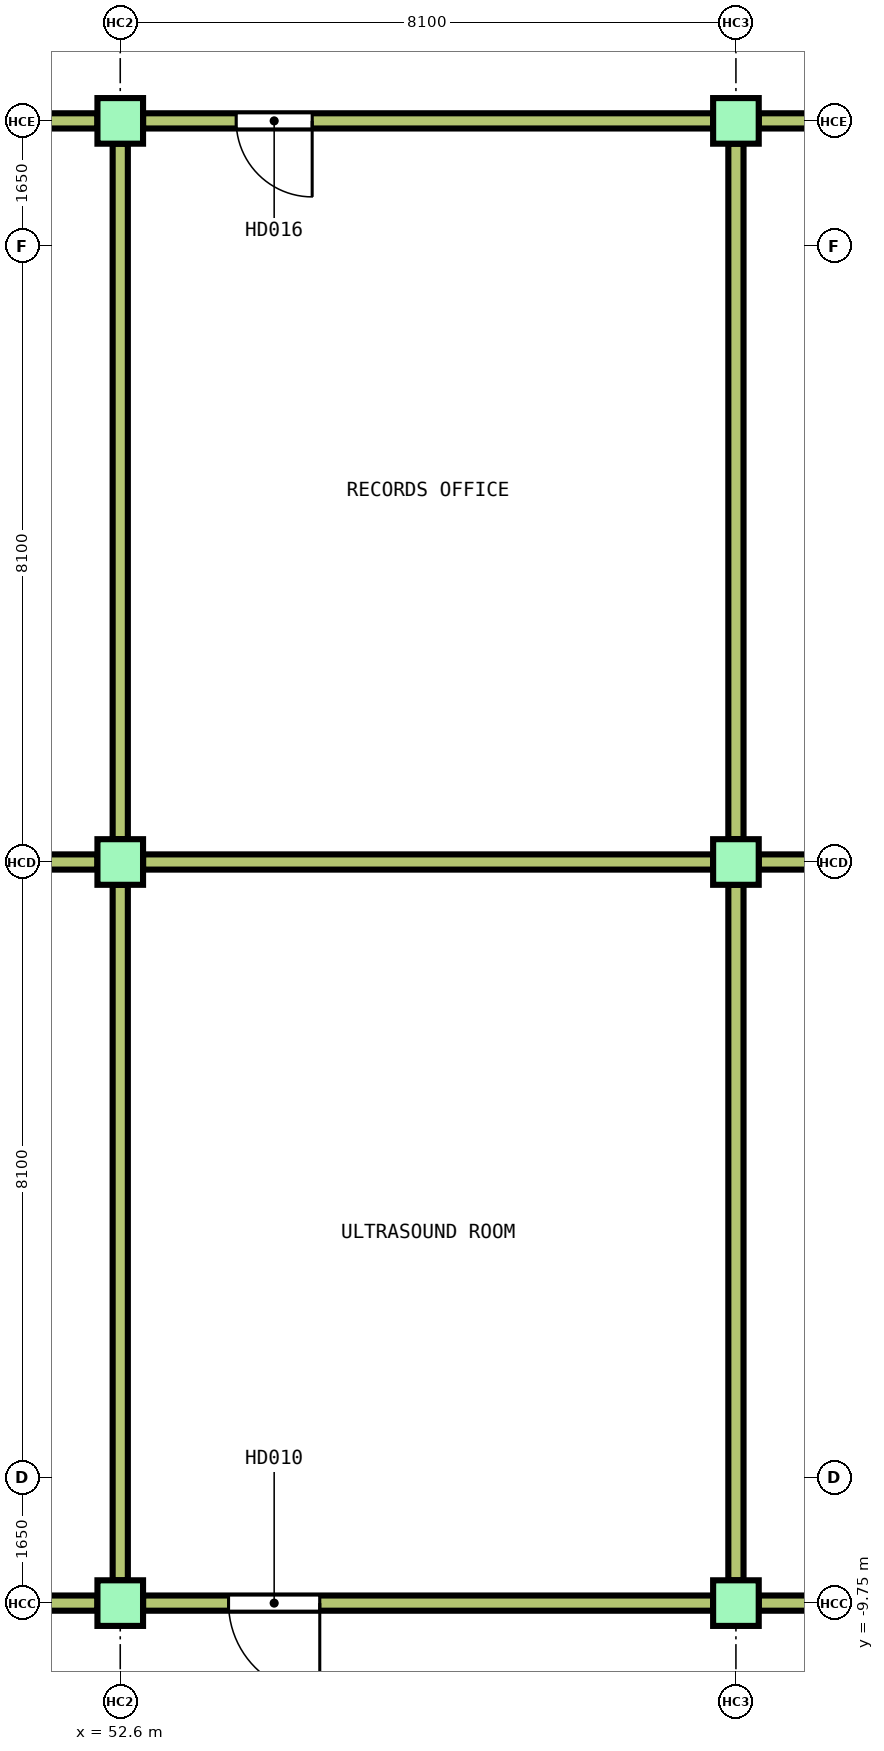
"""IFC4 building model, lengths in metres.
Left out: names, types, materials, properties, quantities, classifications, styles, units other than length and angle.
Written with IfcOpenShell. Run it as: python <this file> out.ifc"""

import sys

from ifc_helpers import new_model, si_unit, direction, frame, frame_2d, origin, origin_2d, place, context, subcontext, project, spatial, rectangle, extrude, element, fill, save


model = new_model("IFC4")
c1 = context("Model", 3, precision=1e-05, world=origin(), true_north=direction((0.0, 1.0)))
c2 = subcontext(c1, "Body", "Model", "MODEL_VIEW")
j1 = project(units=[si_unit("LENGTHUNIT", "METRE"), si_unit("PLANEANGLEUNIT", "RADIAN")], contexts=[c1])
p1 = place(None, origin())
s1 = spatial("IfcSite", under=j1, at=p1, CompositionType="ELEMENT")
p2 = place(p1, origin())
s2 = spatial("IfcBuilding", under=s1, at=p2, CompositionType="ELEMENT")
p3 = place(p2, origin())
s3 = spatial("IfcBuildingStorey", under=s2, at=p3, CompositionType="ELEMENT", Elevation=0.0)
for number, where, z_axis, x_axis in (
    (1, (52.6, -9.75, -0.25), (0.0, 0.0, 1.0), (1.0, 0.0, 0.0)),
    (2, (60.7, -9.75, -0.25), (0.0, 0.0, 1.0), (1.0, 0.0, 0.0)),
    (3, (52.6, 0.0, -0.25), (0.0, 0.0, 1.0), (1.0, 0.0, 0.0)),
    (4, (60.7, 0.0, -0.25), (0.0, 0.0, 1.0), (1.0, 0.0, 0.0)),
    (5, (52.6, 9.75, -0.25), (0.0, 0.0, 1.0), (1.0, 0.0, 0.0)),
    (6, (60.7, 9.75, -0.25), (0.0, 0.0, 1.0), (1.0, 0.0, 0.0)),
):
    element("IfcColumn", number, at=place(p3, frame(where, z_axis=z_axis, x_axis=x_axis)), inside=s3, PredefinedType="COLUMN", context=c2, shape_type="SweptSolid", body=[
        extrude(rectangle(XDim=0.6, YDim=0.6, at=origin_2d()), origin(), (0.0, 0.0, 1.0), 5.85),
    ])
for number, where, z_axis, x_axis in (
    (7, (60.7, -9.45, 0.0), (0.0, 0.0, 1.0), (0.0, 1.0, 0.0)),
    (8, (60.7, 0.3, 0.0), (0.0, 0.0, 1.0), (0.0, 1.0, 0.0)),
):
    element("IfcWall", number, at=place(p3, frame(where, z_axis=z_axis, x_axis=x_axis)), inside=s3, PredefinedType="PARTITIONING", context=c2, shape_type="SweptSolid", body=[
        extrude(rectangle(XDim=9.15, YDim=0.2, at=frame_2d((4.575, 0.0))), origin(), (0.0, 0.0, 1.0), 4.8),
    ])
p4 = place(p3, frame((44.8, -9.75, 0.0), z_axis=(0.0, 0.0, 1.0), x_axis=(1.0, 0.0, 0.0)))
e9 = element("IfcWall", 9, at=p4, inside=s3, PredefinedType="PARTITIONING", context=c2, shape_type="SweptSolid", body=[
    extrude(rectangle(XDim=7.5, YDim=0.2, at=frame_2d((3.75, 0.0))), origin(), (0.0, 0.0, 1.0), 4.8),
])
p5 = place(p4, frame((1.125, 0.0, 0.0)))
e10 = element("IfcOpeningElement", 10, at=p5, cuts=e9, PredefinedType="OPENING", context=c2, shape_type="SweptSolid", body=[
    extrude(rectangle(XDim=1.2, YDim=2.1, at=frame_2d((0.6, 1.05))), frame((0.0, 0.11, 0.0), z_axis=(0.0, -1.0, 0.0), x_axis=(1.0, 0.0, 0.0)), (0.0, 0.0, 1.0), 0.22),
])
p6 = place(p3, frame((52.9, -9.75, 0.0), z_axis=(0.0, 0.0, 1.0), x_axis=(1.0, 0.0, 0.0)))
e11 = element("IfcWall", 11, at=p6, inside=s3, PredefinedType="PARTITIONING", context=c2, shape_type="SweptSolid", body=[
    extrude(rectangle(XDim=7.5, YDim=0.2, at=frame_2d((3.75, 0.0))), origin(), (0.0, 0.0, 1.0), 4.8),
])
p7 = place(p6, frame((1.125, 0.0, 0.0)))
e12 = element("IfcOpeningElement", 12, at=p7, cuts=e11, PredefinedType="OPENING", context=c2, shape_type="SweptSolid", body=[
    extrude(rectangle(XDim=1.2, YDim=2.1, at=frame_2d((0.6, 1.05))), frame((0.0, 0.11, 0.0), z_axis=(0.0, -1.0, 0.0), x_axis=(1.0, 0.0, 0.0)), (0.0, 0.0, 1.0), 0.22),
])
p8 = place(p3, frame((61.0, -9.75, 0.0), z_axis=(0.0, 0.0, 1.0), x_axis=(1.0, 0.0, 0.0)))
e13 = element("IfcWall", 13, at=p8, inside=s3, PredefinedType="PARTITIONING", context=c2, shape_type="SweptSolid", body=[
    extrude(rectangle(XDim=7.5, YDim=0.2, at=frame_2d((3.75, 0.0))), origin(), (0.0, 0.0, 1.0), 4.8),
])
p9 = place(p8, frame((0.825, 0.0, 0.0)))
e14 = element("IfcOpeningElement", 14, at=p9, cuts=e13, PredefinedType="OPENING", context=c2, shape_type="SweptSolid", body=[
    extrude(rectangle(XDim=1.8, YDim=2.1, at=frame_2d((0.9, 1.05))), frame((0.0, 0.11, 0.0), z_axis=(0.0, -1.0, 0.0), x_axis=(1.0, 0.0, 0.0)), (0.0, 0.0, 1.0), 0.22),
])
for number, where, z_axis, x_axis in (
    (15, (44.8, 0.0, 0.0), (0.0, 0.0, 1.0), (1.0, 0.0, 0.0)),
    (16, (52.9, 0.0, 0.0), (0.0, 0.0, 1.0), (1.0, 0.0, 0.0)),
    (17, (61.0, 0.0, 0.0), (0.0, 0.0, 1.0), (1.0, 0.0, 0.0)),
):
    element("IfcWall", number, at=place(p3, frame(where, z_axis=z_axis, x_axis=x_axis)), inside=s3, PredefinedType="PARTITIONING", context=c2, shape_type="SweptSolid", body=[
        extrude(rectangle(XDim=7.5, YDim=0.2, at=frame_2d((3.75, 0.0))), origin(), (0.0, 0.0, 1.0), 4.8),
    ])
for number, where, z_axis, x_axis in (
    (18, (52.6, -9.45, 0.0), (0.0, 0.0, 1.0), (0.0, 1.0, 0.0)),
    (19, (52.6, 0.3, 0.0), (0.0, 0.0, 1.0), (0.0, 1.0, 0.0)),
):
    element("IfcWall", number, at=place(p3, frame(where, z_axis=z_axis, x_axis=x_axis)), inside=s3, PredefinedType="PARTITIONING", context=c2, shape_type="SweptSolid", body=[
        extrude(rectangle(XDim=9.15, YDim=0.2, at=frame_2d((4.575, 0.0))), origin(), (0.0, 0.0, 1.0), 4.8),
    ])
p10 = place(p3, frame((44.8, 9.75, 0.0), z_axis=(0.0, 0.0, 1.0), x_axis=(1.0, 0.0, 0.0)))
e20 = element("IfcWall", 20, at=p10, inside=s3, PredefinedType="PARTITIONING", context=c2, shape_type="SweptSolid", body=[
    extrude(rectangle(XDim=7.5, YDim=0.2, at=frame_2d((3.75, 0.0))), origin(), (0.0, 0.0, 1.0), 4.8),
])
p11 = place(p10, frame((1.225, 0.0, 0.0)))
e21 = element("IfcOpeningElement", 21, at=p11, cuts=e20, PredefinedType="OPENING", context=c2, shape_type="SweptSolid", body=[
    extrude(rectangle(XDim=1.0, YDim=2.1, at=frame_2d((0.5, 1.05))), frame((0.0, 0.11, 0.0), z_axis=(0.0, -1.0, 0.0), x_axis=(1.0, 0.0, 0.0)), (0.0, 0.0, 1.0), 0.22),
])
p12 = place(p3, frame((52.9, 9.75, 0.0), z_axis=(0.0, 0.0, 1.0), x_axis=(1.0, 0.0, 0.0)))
e22 = element("IfcWall", 22, at=p12, inside=s3, PredefinedType="PARTITIONING", context=c2, shape_type="SweptSolid", body=[
    extrude(rectangle(XDim=7.5, YDim=0.2, at=frame_2d((3.75, 0.0))), origin(), (0.0, 0.0, 1.0), 4.8),
])
p13 = place(p12, frame((1.225, 0.0, 0.0)))
e23 = element("IfcOpeningElement", 23, at=p13, cuts=e22, PredefinedType="OPENING", context=c2, shape_type="SweptSolid", body=[
    extrude(rectangle(XDim=1.0, YDim=2.1, at=frame_2d((0.5, 1.05))), frame((0.0, 0.11, 0.0), z_axis=(0.0, -1.0, 0.0), x_axis=(1.0, 0.0, 0.0)), (0.0, 0.0, 1.0), 0.22),
])
p14 = place(p3, frame((61.0, 9.75, 0.0), z_axis=(0.0, 0.0, 1.0), x_axis=(1.0, 0.0, 0.0)))
e24 = element("IfcWall", 24, at=p14, inside=s3, PredefinedType="PARTITIONING", context=c2, shape_type="SweptSolid", body=[
    extrude(rectangle(XDim=7.5, YDim=0.2, at=frame_2d((3.75, 0.0))), origin(), (0.0, 0.0, 1.0), 4.8),
])
p15 = place(p14, frame((0.825, 0.0, 0.0)))
e25 = element("IfcOpeningElement", 25, at=p15, cuts=e24, PredefinedType="OPENING", context=c2, shape_type="SweptSolid", body=[
    extrude(rectangle(XDim=1.8, YDim=2.1, at=frame_2d((0.9, 1.05))), frame((0.0, 0.11, 0.0), z_axis=(0.0, -1.0, 0.0), x_axis=(1.0, 0.0, 0.0)), (0.0, 0.0, 1.0), 0.22),
])
p16 = place(p7, origin())
e26 = element("IfcDoor", 26, at=p16, inside=s3, OperationType="SINGLE_SWING_LEFT", PredefinedType="DOOR", context=c2, shape_type="SweptSolid", body=[
    extrude(rectangle(XDim=1.2, YDim=2.1, at=frame_2d((0.6, 1.05))), frame((0.0, 0.025, 0.0), z_axis=(0.0, -1.0, 0.0), x_axis=(1.0, 0.0, 0.0)), (0.0, 0.0, 1.0), 0.05),
])
fill(e12, e26)
p17 = place(p13, origin())
e27 = element("IfcDoor", 27, at=p17, inside=s3, OperationType="SINGLE_SWING_LEFT", PredefinedType="DOOR", context=c2, shape_type="SweptSolid", body=[
    extrude(rectangle(XDim=1.0, YDim=2.1, at=frame_2d((0.5, 1.05))), frame((0.0, 0.025, 0.0), z_axis=(0.0, -1.0, 0.0), x_axis=(1.0, 0.0, 0.0)), (0.0, 0.0, 1.0), 0.05),
])
fill(e23, e27)
save(model, sys.argv[1])
